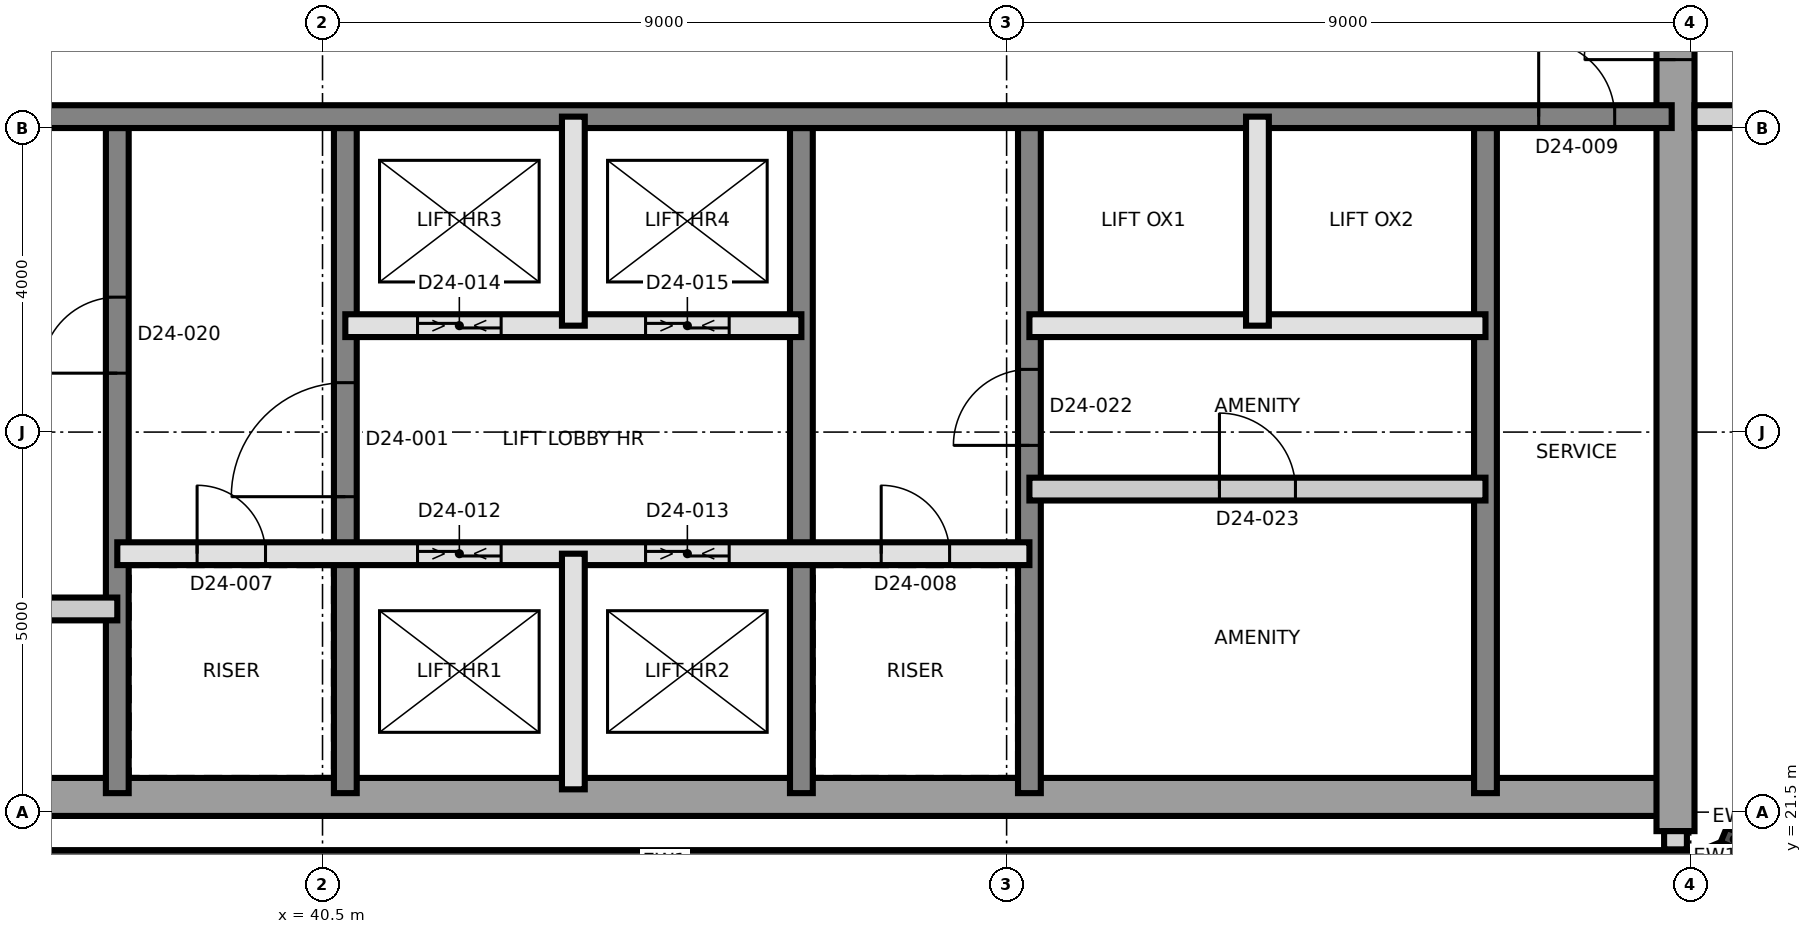
"""IFC4 building model, lengths in metres.
Left out: names, types, materials, properties, quantities, classifications, styles, units other than length and angle.
Written with IfcOpenShell. Run it as: python <this file> out.ifc"""

import sys

from ifc_helpers import new_model, si_unit, direction, frame, frame_2d, origin, place, context, subcontext, project, spatial, rectangle, extrude, element, fill, save


model = new_model("IFC4")
c1 = context("Model", 3, precision=1e-05, world=origin(), true_north=direction((0.0, 1.0)))
c2 = subcontext(c1, "Body", "Model", "MODEL_VIEW")
j1 = project(units=[si_unit("LENGTHUNIT", "METRE"), si_unit("PLANEANGLEUNIT", "RADIAN")], contexts=[c1])
p1 = place(None, origin())
s1 = spatial("IfcSite", under=j1, at=p1, CompositionType="ELEMENT")
p2 = place(p1, origin())
s2 = spatial("IfcBuilding", under=s1, at=p2, CompositionType="ELEMENT")
p3 = place(p2, frame((0.0, 0.0, 214.3)))
s3 = spatial("IfcBuildingStorey", under=s2, at=p3, CompositionType="ELEMENT", Elevation=214.3)
p4 = place(p3, frame((31.25, 21.7, 0.0), z_axis=(0.0, 0.0, 1.0), x_axis=(1.0, 0.0, 0.0)))
e1 = element("IfcWall", 1, at=p4, inside=s3, PredefinedType="SHEAR", context=c2, shape_type="SweptSolid", body=[
    extrude(rectangle(XDim=27.0, YDim=0.5, at=frame_2d((13.5, 0.0))), origin(), (0.0, 0.0, 1.0), 3.7),
])
p5 = place(p3, frame((58.3, 21.25, 0.0), z_axis=(0.0, 0.0, 1.0), x_axis=(0.0, 1.0, 0.0)))
e2 = element("IfcWall", 2, at=p5, inside=s3, PredefinedType="SHEAR", context=c2, shape_type="SweptSolid", body=[
    extrude(rectangle(XDim=18.5, YDim=0.5, at=frame_2d((9.25, 0.0))), origin(), (0.0, 0.0, 1.0), 3.7),
])
p6 = place(p5, frame((10.15, 0.0, 0.0)))
e3 = element("IfcOpeningElement", 3, at=p6, cuts=e2, PredefinedType="OPENING", context=c2, shape_type="SweptSolid", body=[
    extrude(rectangle(XDim=1.2, YDim=2.1, at=frame_2d((0.6, 1.05))), frame((0.0, 0.26, 0.0), z_axis=(0.0, -1.0, 0.0), x_axis=(1.0, 0.0, 0.0)), (0.0, 0.0, 1.0), 0.52),
])
p7 = place(p3, frame((37.8, 21.75, 0.0), z_axis=(0.0, 0.0, 1.0), x_axis=(0.0, 1.0, 0.0)))
e4 = element("IfcWall", 4, at=p7, inside=s3, PredefinedType="SHEAR", context=c2, shape_type="SweptSolid", body=[
    extrude(rectangle(XDim=8.75, YDim=0.3, at=frame_2d((4.375, 0.0))), origin(), (0.0, 0.0, 1.0), 3.7),
])
p8 = place(p7, frame((5.525, 0.0, 0.0)))
e5 = element("IfcOpeningElement", 5, at=p8, cuts=e4, PredefinedType="OPENING", context=c2, shape_type="SweptSolid", body=[
    extrude(rectangle(XDim=1.0, YDim=2.1, at=frame_2d((0.5, 1.05))), frame((0.0, 0.16, 0.0), z_axis=(0.0, -1.0, 0.0), x_axis=(1.0, 0.0, 0.0)), (0.0, 0.0, 1.0), 0.32),
])
p9 = place(p3, frame((40.8, 21.75, 0.0), z_axis=(0.0, 0.0, 1.0), x_axis=(0.0, 1.0, 0.0)))
e6 = element("IfcWall", 6, at=p9, inside=s3, PredefinedType="SHEAR", context=c2, shape_type="SweptSolid", body=[
    extrude(rectangle(XDim=8.75, YDim=0.3, at=frame_2d((4.375, 0.0))), origin(), (0.0, 0.0, 1.0), 3.7),
])
p10 = place(p9, frame((3.9, 0.0, 0.0)))
e7 = element("IfcOpeningElement", 7, at=p10, cuts=e6, PredefinedType="OPENING", context=c2, shape_type="SweptSolid", body=[
    extrude(rectangle(XDim=1.5, YDim=2.1, at=frame_2d((0.75, 1.05))), frame((0.0, 0.16, 0.0), z_axis=(0.0, -1.0, 0.0), x_axis=(1.0, 0.0, 0.0)), (0.0, 0.0, 1.0), 0.32),
])
p11 = place(p3, frame((46.8, 21.75, 0.0), z_axis=(0.0, 0.0, 1.0), x_axis=(0.0, 1.0, 0.0)))
e8 = element("IfcWall", 8, at=p11, inside=s3, PredefinedType="SHEAR", context=c2, shape_type="SweptSolid", body=[
    extrude(rectangle(XDim=8.75, YDim=0.3, at=frame_2d((4.375, 0.0))), origin(), (0.0, 0.0, 1.0), 3.7),
])
p12 = place(p3, frame((49.8, 21.75, 0.0), z_axis=(0.0, 0.0, 1.0), x_axis=(0.0, 1.0, 0.0)))
e9 = element("IfcWall", 9, at=p12, inside=s3, PredefinedType="SHEAR", context=c2, shape_type="SweptSolid", body=[
    extrude(rectangle(XDim=8.75, YDim=0.3, at=frame_2d((4.375, 0.0))), origin(), (0.0, 0.0, 1.0), 3.7),
])
p13 = place(p12, frame((4.575, 0.0, 0.0)))
e10 = element("IfcOpeningElement", 10, at=p13, cuts=e9, PredefinedType="OPENING", context=c2, shape_type="SweptSolid", body=[
    extrude(rectangle(XDim=1.0, YDim=2.1, at=frame_2d((0.5, 1.05))), frame((0.0, 0.16, 0.0), z_axis=(0.0, -1.0, 0.0), x_axis=(1.0, 0.0, 0.0)), (0.0, 0.0, 1.0), 0.32),
])
p14 = place(p3, frame((55.8, 21.75, 0.0), z_axis=(0.0, 0.0, 1.0), x_axis=(0.0, 1.0, 0.0)))
e11 = element("IfcWall", 11, at=p14, inside=s3, PredefinedType="SHEAR", context=c2, shape_type="SweptSolid", body=[
    extrude(rectangle(XDim=8.75, YDim=0.3, at=frame_2d((4.375, 0.0))), origin(), (0.0, 0.0, 1.0), 3.7),
])
p15 = place(p3, frame((31.75, 30.65, 0.0), z_axis=(0.0, 0.0, 1.0), x_axis=(1.0, 0.0, 0.0)))
e12 = element("IfcWall", 12, at=p15, inside=s3, PredefinedType="SHEAR", context=c2, shape_type="SweptSolid", body=[
    extrude(rectangle(XDim=26.5, YDim=0.3, at=frame_2d((13.25, 0.0))), origin(), (0.0, 0.0, 1.0), 3.7),
])
p16 = place(p15, frame((24.75, 0.0, 0.0)))
e13 = element("IfcOpeningElement", 13, at=p16, cuts=e12, PredefinedType="OPENING", context=c2, shape_type="SweptSolid", body=[
    extrude(rectangle(XDim=1.0, YDim=2.1, at=frame_2d((0.5, 1.05))), frame((0.0, 0.16, 0.0), z_axis=(0.0, -1.0, 0.0), x_axis=(1.0, 0.0, 0.0)), (0.0, 0.0, 1.0), 0.32),
])
p17 = place(p3, frame((31.36, 20.85, 0.0), z_axis=(0.0, 0.0, 1.0), x_axis=(1.0, 0.0, 0.0)))
e14 = element("IfcWall", 14, at=p17, inside=s3, PredefinedType="SOLIDWALL", context=c2, shape_type="SweptSolid", body=[
    extrude(rectangle(XDim=27.281, YDim=0.3, at=frame_2d((13.64, 0.0))), origin(), (0.0, 0.0, 1.0), 3.4),
])
p18 = place(p3, frame((58.698, 20.861, 0.0), z_axis=(0.0, 0.0, 1.0), x_axis=(0.923757413239, 0.38297812142, 0.0)))
e15 = element("IfcWall", 15, at=p18, inside=s3, PredefinedType="SOLIDWALL", context=c2, shape_type="SweptSolid", body=[
    extrude(rectangle(XDim=0.275, YDim=0.3, at=frame_2d((0.138, 0.0))), origin(), (0.0, 0.0, 1.0), 3.4),
])
p19 = place(p3, frame((59.033, 21.048, 0.0), z_axis=(0.0, 0.0, 1.0), x_axis=(0.383262727373, 0.923639367831, 0.0)))
e16 = element("IfcWall", 16, at=p19, inside=s3, PredefinedType="SOLIDWALL", context=c2, shape_type="SweptSolid", body=[
    extrude(rectangle(XDim=0.205, YDim=0.3, at=frame_2d((0.103, 0.0))), origin(), (0.0, 0.0, 1.0), 3.4),
])
p20 = place(p3, frame((31.8, 24.173, 0.0), z_axis=(0.0, 0.0, 1.0), x_axis=(1.0, 0.0, 0.0)))
e17 = element("IfcWall", 17, at=p20, inside=s3, PredefinedType="PARTITIONING", context=c2, shape_type="SweptSolid", body=[
    extrude(rectangle(XDim=6.0, YDim=0.3, at=frame_2d((3.0, 0.0))), origin(), (0.0, 0.0, 1.0), 3.4),
])
p21 = place(p20, frame((2.5, 0.0, 0.0)))
e18 = element("IfcOpeningElement", 18, at=p21, cuts=e17, PredefinedType="OPENING", context=c2, shape_type="SweptSolid", body=[
    extrude(rectangle(XDim=1.0, YDim=2.1, at=frame_2d((0.5, 1.05))), frame((0.0, 0.16, 0.0), z_axis=(0.0, -1.0, 0.0), x_axis=(1.0, 0.0, 0.0)), (0.0, 0.0, 1.0), 0.32),
])
p22 = place(p3, frame((37.8, 24.9, 0.0), z_axis=(0.0, 0.0, 1.0), x_axis=(1.0, 0.0, 0.0)))
e19 = element("IfcWall", 19, at=p22, inside=s3, PredefinedType="SOLIDWALL", context=c2, shape_type="SweptSolid", body=[
    extrude(rectangle(XDim=12.0, YDim=0.3, at=frame_2d((6.0, 0.0))), origin(), (0.0, 0.0, 1.0), 3.4),
])
p23 = place(p22, frame((1.05, 0.0, 0.0)))
e20 = element("IfcOpeningElement", 20, at=p23, cuts=e19, PredefinedType="OPENING", context=c2, shape_type="SweptSolid", body=[
    extrude(rectangle(XDim=0.9, YDim=2.1, at=frame_2d((0.45, 1.05))), frame((0.0, 0.16, 0.0), z_axis=(0.0, -1.0, 0.0), x_axis=(1.0, 0.0, 0.0)), (0.0, 0.0, 1.0), 0.32),
])
p24 = place(p22, frame((10.05, 0.0, 0.0)))
e21 = element("IfcOpeningElement", 21, at=p24, cuts=e19, PredefinedType="OPENING", context=c2, shape_type="SweptSolid", body=[
    extrude(rectangle(XDim=0.9, YDim=2.1, at=frame_2d((0.45, 1.05))), frame((0.0, 0.16, 0.0), z_axis=(0.0, -1.0, 0.0), x_axis=(1.0, 0.0, 0.0)), (0.0, 0.0, 1.0), 0.32),
])
p25 = place(p22, frame((3.95, 0.0, 0.0)))
e22 = element("IfcOpeningElement", 22, at=p25, cuts=e19, PredefinedType="OPENING", context=c2, shape_type="SweptSolid", body=[
    extrude(rectangle(XDim=1.1, YDim=2.4, at=frame_2d((0.55, 1.2))), frame((0.0, 0.16, 0.0), z_axis=(0.0, -1.0, 0.0), x_axis=(1.0, 0.0, 0.0)), (0.0, 0.0, 1.0), 0.32),
])
p26 = place(p22, frame((6.95, 0.0, 0.0)))
e23 = element("IfcOpeningElement", 23, at=p26, cuts=e19, PredefinedType="OPENING", context=c2, shape_type="SweptSolid", body=[
    extrude(rectangle(XDim=1.1, YDim=2.4, at=frame_2d((0.55, 1.2))), frame((0.0, 0.16, 0.0), z_axis=(0.0, -1.0, 0.0), x_axis=(1.0, 0.0, 0.0)), (0.0, 0.0, 1.0), 0.32),
])
p27 = place(p3, frame((49.8, 25.75, 0.0), z_axis=(0.0, 0.0, 1.0), x_axis=(1.0, 0.0, 0.0)))
e24 = element("IfcWall", 24, at=p27, inside=s3, PredefinedType="PARTITIONING", context=c2, shape_type="SweptSolid", body=[
    extrude(rectangle(XDim=6.0, YDim=0.3, at=frame_2d((3.0, 0.0))), origin(), (0.0, 0.0, 1.0), 3.4),
])
p28 = place(p27, frame((2.5, 0.0, 0.0)))
e25 = element("IfcOpeningElement", 25, at=p28, cuts=e24, PredefinedType="OPENING", context=c2, shape_type="SweptSolid", body=[
    extrude(rectangle(XDim=1.0, YDim=2.1, at=frame_2d((0.5, 1.05))), frame((0.0, 0.16, 0.0), z_axis=(0.0, -1.0, 0.0), x_axis=(1.0, 0.0, 0.0)), (0.0, 0.0, 1.0), 0.32),
])
p29 = place(p3, frame((40.8, 27.9, 0.0), z_axis=(0.0, 0.0, 1.0), x_axis=(1.0, 0.0, 0.0)))
e26 = element("IfcWall", 26, at=p29, inside=s3, PredefinedType="SOLIDWALL", context=c2, shape_type="SweptSolid", body=[
    extrude(rectangle(XDim=6.0, YDim=0.3, at=frame_2d((3.0, 0.0))), origin(), (0.0, 0.0, 1.0), 3.4),
])
p30 = place(p29, frame((0.95, 0.0, 0.0)))
e27 = element("IfcOpeningElement", 27, at=p30, cuts=e26, PredefinedType="OPENING", context=c2, shape_type="SweptSolid", body=[
    extrude(rectangle(XDim=1.1, YDim=2.4, at=frame_2d((0.55, 1.2))), frame((0.0, 0.16, 0.0), z_axis=(0.0, -1.0, 0.0), x_axis=(1.0, 0.0, 0.0)), (0.0, 0.0, 1.0), 0.32),
])
p31 = place(p29, frame((3.95, 0.0, 0.0)))
e28 = element("IfcOpeningElement", 28, at=p31, cuts=e26, PredefinedType="OPENING", context=c2, shape_type="SweptSolid", body=[
    extrude(rectangle(XDim=1.1, YDim=2.4, at=frame_2d((0.55, 1.2))), frame((0.0, 0.16, 0.0), z_axis=(0.0, -1.0, 0.0), x_axis=(1.0, 0.0, 0.0)), (0.0, 0.0, 1.0), 0.32),
])
p32 = place(p3, frame((49.8, 27.9, 0.0), z_axis=(0.0, 0.0, 1.0), x_axis=(1.0, 0.0, 0.0)))
e29 = element("IfcWall", 29, at=p32, inside=s3, PredefinedType="SOLIDWALL", context=c2, shape_type="SweptSolid", body=[
    extrude(rectangle(XDim=6.0, YDim=0.3, at=frame_2d((3.0, 0.0))), origin(), (0.0, 0.0, 1.0), 3.4),
])
p33 = place(p3, frame((43.8, 21.8, 0.0), z_axis=(0.0, 0.0, 1.0), x_axis=(0.0, 1.0, 0.0)))
e30 = element("IfcWall", 30, at=p33, inside=s3, PredefinedType="SOLIDWALL", context=c2, shape_type="SweptSolid", body=[
    extrude(rectangle(XDim=3.1, YDim=0.3, at=frame_2d((1.55, 0.0))), origin(), (0.0, 0.0, 1.0), 3.4),
])
for number, where, z_axis, x_axis in (
    (31, (43.8, 27.9, 0.0), (0.0, 0.0, 1.0), (0.0, 1.0, 0.0)),
    (32, (52.8, 27.9, 0.0), (0.0, 0.0, 1.0), (0.0, 1.0, 0.0)),
):
    element("IfcWall", number, at=place(p3, frame(where, z_axis=z_axis, x_axis=x_axis)), inside=s3, PredefinedType="SOLIDWALL", context=c2, shape_type="SweptSolid", body=[
        extrude(rectangle(XDim=2.75, YDim=0.3, at=frame_2d((1.375, 0.0))), origin(), (0.0, 0.0, 1.0), 3.4),
    ])
p34 = place(p3, frame((58.55, 30.65, 0.0), z_axis=(0.0, 0.0, 1.0), x_axis=(1.0, 0.0, 0.0)))
e33 = element("IfcWall", 33, at=p34, inside=s3, PredefinedType="PARTITIONING", context=c2, shape_type="SweptSolid", body=[
    extrude(rectangle(XDim=26.78, YDim=0.3, at=frame_2d((13.39, 0.0))), origin(), (0.0, 0.0, 1.0), 3.4),
])
p35 = place(p34, frame((2.3, 0.0, 0.0)))
e34 = element("IfcOpeningElement", 34, at=p35, cuts=e33, PredefinedType="OPENING", context=c2, shape_type="SweptSolid", body=[
    extrude(rectangle(XDim=1.0, YDim=2.4, at=frame_2d((0.5, 1.2))), frame((0.0, 0.16, 0.0), z_axis=(0.0, -1.0, 0.0), x_axis=(1.0, 0.0, 0.0)), (0.0, 0.0, 1.0), 0.32),
])
p36 = place(p34, frame((10.1, 0.0, 0.0)))
e35 = element("IfcOpeningElement", 35, at=p36, cuts=e33, PredefinedType="OPENING", context=c2, shape_type="SweptSolid", body=[
    extrude(rectangle(XDim=1.0, YDim=2.1, at=frame_2d((0.5, 1.05))), frame((0.0, 0.16, 0.0), z_axis=(0.0, -1.0, 0.0), x_axis=(1.0, 0.0, 0.0)), (0.0, 0.0, 1.0), 0.32),
])
p37 = place(p34, frame((15.95, 0.0, 0.0)))
e36 = element("IfcOpeningElement", 36, at=p37, cuts=e33, PredefinedType="OPENING", context=c2, shape_type="SweptSolid", body=[
    extrude(rectangle(XDim=1.0, YDim=2.1, at=frame_2d((0.5, 1.05))), frame((0.0, 0.16, 0.0), z_axis=(0.0, -1.0, 0.0), x_axis=(1.0, 0.0, 0.0)), (0.0, 0.0, 1.0), 0.32),
])
p38 = place(p34, frame((19.085, 0.0, 0.0)))
e37 = element("IfcOpeningElement", 37, at=p38, cuts=e33, PredefinedType="OPENING", context=c2, shape_type="SweptSolid", body=[
    extrude(rectangle(XDim=1.2, YDim=2.1, at=frame_2d((0.6, 1.05))), frame((0.0, 0.16, 0.0), z_axis=(0.0, -1.0, 0.0), x_axis=(1.0, 0.0, 0.0)), (0.0, 0.0, 1.0), 0.32),
])
p39 = place(p34, frame((22.335, 0.0, 0.0)))
e38 = element("IfcOpeningElement", 38, at=p39, cuts=e33, PredefinedType="OPENING", context=c2, shape_type="SweptSolid", body=[
    extrude(rectangle(XDim=1.0, YDim=2.1, at=frame_2d((0.5, 1.05))), frame((0.0, 0.16, 0.0), z_axis=(0.0, -1.0, 0.0), x_axis=(1.0, 0.0, 0.0)), (0.0, 0.0, 1.0), 0.32),
])
p40 = place(p3, frame((58.3, 21.25, 0.0), z_axis=(0.0, 0.0, 1.0), x_axis=(0.0, -1.0, 0.0)))
e39 = element("IfcWall", 39, at=p40, inside=s3, PredefinedType="PARTITIONING", context=c2, shape_type="SweptSolid", body=[
    extrude(rectangle(XDim=0.24, YDim=0.3, at=frame_2d((0.12, 0.0))), origin(), (0.0, 0.0, 1.0), 3.4),
])
p41 = place(p10, origin())
e40 = element("IfcDoor", 40, at=p41, inside=s3, OperationType="SINGLE_SWING_RIGHT", PredefinedType="DOOR", context=c2, shape_type="SweptSolid", body=[
    extrude(rectangle(XDim=1.5, YDim=2.1, at=frame_2d((0.75, 1.05))), frame((0.0, 0.025, 0.0), z_axis=(0.0, -1.0, 0.0), x_axis=(1.0, 0.0, 0.0)), (0.0, 0.0, 1.0), 0.05),
])
fill(e7, e40)
p42 = place(p23, origin())
e41 = element("IfcDoor", 41, at=p42, inside=s3, OperationType="SINGLE_SWING_LEFT", PredefinedType="DOOR", context=c2, shape_type="SweptSolid", body=[
    extrude(rectangle(XDim=0.9, YDim=2.1, at=frame_2d((0.45, 1.05))), frame((0.0, 0.025, 0.0), z_axis=(0.0, -1.0, 0.0), x_axis=(1.0, 0.0, 0.0)), (0.0, 0.0, 1.0), 0.05),
])
fill(e20, e41)
p43 = place(p24, origin())
e42 = element("IfcDoor", 42, at=p43, inside=s3, OperationType="SINGLE_SWING_RIGHT", PredefinedType="DOOR", context=c2, shape_type="SweptSolid", body=[
    extrude(rectangle(XDim=0.9, YDim=2.1, at=frame_2d((0.45, 1.05))), frame((0.0, 0.025, 0.0), z_axis=(0.0, -1.0, 0.0), x_axis=(1.0, 0.0, 0.0)), (0.0, 0.0, 1.0), 0.05),
])
fill(e21, e42)
p44 = place(p16, origin())
e43 = element("IfcDoor", 43, at=p44, inside=s3, OperationType="SINGLE_SWING_LEFT", PredefinedType="DOOR", context=c2, shape_type="SweptSolid", body=[
    extrude(rectangle(XDim=1.0, YDim=2.1, at=frame_2d((0.5, 1.05))), frame((0.0, 0.025, 0.0), z_axis=(0.0, -1.0, 0.0), x_axis=(1.0, 0.0, 0.0)), (0.0, 0.0, 1.0), 0.05),
])
fill(e13, e43)
p45 = place(p6, origin())
e44 = element("IfcDoor", 44, at=p45, inside=s3, OperationType="SINGLE_SWING_LEFT", PredefinedType="DOOR", context=c2, shape_type="SweptSolid", body=[
    extrude(rectangle(XDim=1.2, YDim=2.1, at=frame_2d((0.6, 1.05))), frame((0.0, 0.025, 0.0), z_axis=(0.0, -1.0, 0.0), x_axis=(1.0, 0.0, 0.0)), (0.0, 0.0, 1.0), 0.05),
])
fill(e3, e44)
p46 = place(p25, origin())
e45 = element("IfcDoor", 45, at=p46, inside=s3, OperationType="SLIDING_TO_LEFT", PredefinedType="DOOR", context=c2, shape_type="SweptSolid", body=[
    extrude(rectangle(XDim=1.1, YDim=2.4, at=frame_2d((0.55, 1.2))), frame((0.0, 0.025, 0.0), z_axis=(0.0, -1.0, 0.0), x_axis=(1.0, 0.0, 0.0)), (0.0, 0.0, 1.0), 0.05),
])
fill(e22, e45)
p47 = place(p26, origin())
e46 = element("IfcDoor", 46, at=p47, inside=s3, OperationType="SLIDING_TO_LEFT", PredefinedType="DOOR", context=c2, shape_type="SweptSolid", body=[
    extrude(rectangle(XDim=1.1, YDim=2.4, at=frame_2d((0.55, 1.2))), frame((0.0, 0.025, 0.0), z_axis=(0.0, -1.0, 0.0), x_axis=(1.0, 0.0, 0.0)), (0.0, 0.0, 1.0), 0.05),
])
fill(e23, e46)
p48 = place(p30, origin())
e47 = element("IfcDoor", 47, at=p48, inside=s3, OperationType="SLIDING_TO_LEFT", PredefinedType="DOOR", context=c2, shape_type="SweptSolid", body=[
    extrude(rectangle(XDim=1.1, YDim=2.4, at=frame_2d((0.55, 1.2))), frame((0.0, 0.025, 0.0), z_axis=(0.0, -1.0, 0.0), x_axis=(1.0, 0.0, 0.0)), (0.0, 0.0, 1.0), 0.05),
])
fill(e27, e47)
p49 = place(p31, origin())
e48 = element("IfcDoor", 48, at=p49, inside=s3, OperationType="SLIDING_TO_LEFT", PredefinedType="DOOR", context=c2, shape_type="SweptSolid", body=[
    extrude(rectangle(XDim=1.1, YDim=2.4, at=frame_2d((0.55, 1.2))), frame((0.0, 0.025, 0.0), z_axis=(0.0, -1.0, 0.0), x_axis=(1.0, 0.0, 0.0)), (0.0, 0.0, 1.0), 0.05),
])
fill(e28, e48)
p50 = place(p8, origin())
e49 = element("IfcDoor", 49, at=p50, inside=s3, OperationType="SINGLE_SWING_LEFT", PredefinedType="DOOR", context=c2, shape_type="SweptSolid", body=[
    extrude(rectangle(XDim=1.0, YDim=2.1, at=frame_2d((0.5, 1.05))), frame((0.0, 0.025, 0.0), z_axis=(0.0, -1.0, 0.0), x_axis=(1.0, 0.0, 0.0)), (0.0, 0.0, 1.0), 0.05),
])
fill(e5, e49)
p51 = place(p13, origin())
e50 = element("IfcDoor", 50, at=p51, inside=s3, OperationType="SINGLE_SWING_LEFT", PredefinedType="DOOR", context=c2, shape_type="SweptSolid", body=[
    extrude(rectangle(XDim=1.0, YDim=2.1, at=frame_2d((0.5, 1.05))), frame((0.0, 0.025, 0.0), z_axis=(0.0, -1.0, 0.0), x_axis=(1.0, 0.0, 0.0)), (0.0, 0.0, 1.0), 0.05),
])
fill(e10, e50)
p52 = place(p28, origin())
e51 = element("IfcDoor", 51, at=p52, inside=s3, OperationType="SINGLE_SWING_RIGHT", PredefinedType="DOOR", context=c2, shape_type="SweptSolid", body=[
    extrude(rectangle(XDim=1.0, YDim=2.1, at=frame_2d((0.5, 1.05))), frame((0.0, 0.025, 0.0), z_axis=(0.0, -1.0, 0.0), x_axis=(1.0, 0.0, 0.0)), (0.0, 0.0, 1.0), 0.05),
])
fill(e25, e51)
save(model, sys.argv[1])
